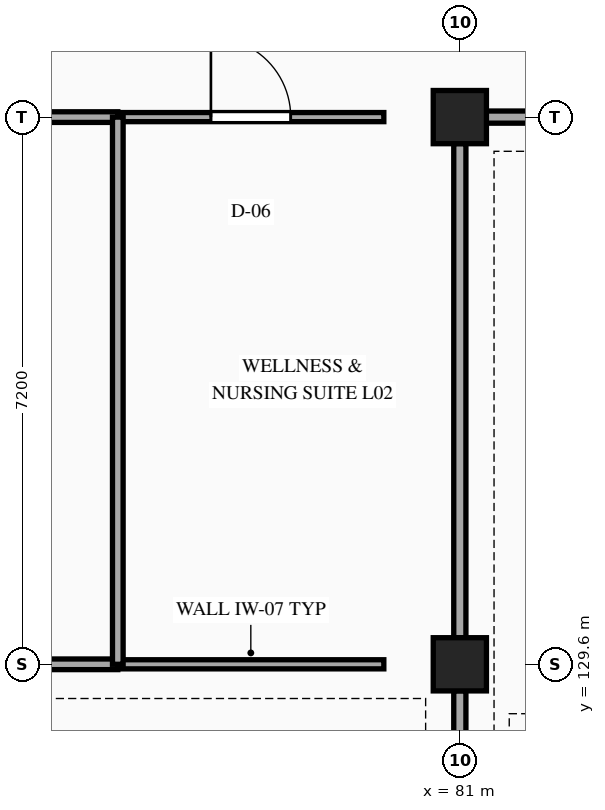
"""IFC4 building model, lengths in metres.
Left out: names, types, materials, properties, quantities, classifications, styles, units other than length and angle.
Written with IfcOpenShell. Run it as: python <this file> out.ifc"""

import sys

from ifc_helpers import new_model, si_unit, direction, frame, frame_2d, origin, origin_2d, place, context, subcontext, project, spatial, rectangle, extrude, element, fill, save


model = new_model("IFC4")
c1 = context("Model", 3, precision=1e-05, world=origin(), true_north=direction((0.0, 1.0)))
c2 = subcontext(c1, "Body", "Model", "MODEL_VIEW")
j1 = project(units=[si_unit("LENGTHUNIT", "METRE"), si_unit("PLANEANGLEUNIT", "RADIAN")], contexts=[c1])
p1 = place(None, origin())
s1 = spatial("IfcSite", under=j1, at=p1, CompositionType="ELEMENT")
p2 = place(p1, origin())
s2 = spatial("IfcBuilding", under=s1, at=p2, CompositionType="ELEMENT")
p3 = place(p2, frame((0.0, 0.0, 10.8)))
s3 = spatial("IfcBuildingStorey", under=s2, at=p3, CompositionType="ELEMENT", Elevation=10.8)
for number, where, z_axis, x_axis in (
    (1, (81.0, 129.6, 0.0), (0.0, 0.0, 1.0), (1.0, 0.0, 0.0)),
    (2, (81.0, 136.8, 0.0), (0.0, 0.0, 1.0), (1.0, 0.0, 0.0)),
):
    element("IfcColumn", number, at=place(p3, frame(where, z_axis=z_axis, x_axis=x_axis)), inside=s3, PredefinedType="COLUMN", context=c2, shape_type="SweptSolid", body=[
        extrude(rectangle(XDim=0.7, YDim=0.7, at=origin_2d()), origin(), (0.0, 0.0, 1.0), 4.5),
    ])
p4 = place(p3, frame((72.348, 129.6, 0.0), z_axis=(0.0, 0.0, 1.0), x_axis=(1.0, 0.0, 0.0)))
e3 = element("IfcWall", 3, at=p4, inside=s3, PredefinedType="PARTITIONING", context=c2, shape_type="SweptSolid", body=[
    extrude(rectangle(XDim=4.152, YDim=0.14, at=frame_2d((2.076, 0.0))), origin(), (0.0, 0.0, 1.0), 3.628),
])
p5 = place(p3, frame((76.5, 129.6, 0.0), z_axis=(0.0, 0.0, 1.0), x_axis=(1.0, 0.0, 0.0)))
e4 = element("IfcWall", 4, at=p5, inside=s3, PredefinedType="PARTITIONING", context=c2, shape_type="SweptSolid", body=[
    extrude(rectangle(XDim=3.5, YDim=0.12, at=frame_2d((1.75, 0.0))), origin(), (0.0, 0.0, 1.0), 3.628),
])
p6 = place(p3, frame((72.348, 136.8, 0.0), z_axis=(0.0, 0.0, 1.0), x_axis=(1.0, 0.0, 0.0)))
e5 = element("IfcWall", 5, at=p6, inside=s3, PredefinedType="PARTITIONING", context=c2, shape_type="SweptSolid", body=[
    extrude(rectangle(XDim=4.152, YDim=0.14, at=frame_2d((2.076, 0.0))), origin(), (0.0, 0.0, 1.0), 3.628),
])
p7 = place(p6, frame((1.601, 0.0, 0.0)))
e6 = element("IfcOpeningElement", 6, at=p7, cuts=e5, PredefinedType="OPENING", context=c2, shape_type="SweptSolid", body=[
    extrude(rectangle(XDim=0.95, YDim=2.1, at=frame_2d((0.475, 1.05))), frame((0.0, 0.08, 0.0), z_axis=(0.0, -1.0, 0.0), x_axis=(1.0, 0.0, 0.0)), (0.0, 0.0, 1.0), 0.16),
])
p8 = place(p3, frame((76.5, 136.8, 0.0), z_axis=(0.0, 0.0, 1.0), x_axis=(1.0, 0.0, 0.0)))
e7 = element("IfcWall", 7, at=p8, inside=s3, PredefinedType="PARTITIONING", context=c2, shape_type="SweptSolid", body=[
    extrude(rectangle(XDim=3.5, YDim=0.12, at=frame_2d((1.75, 0.0))), origin(), (0.0, 0.0, 1.0), 3.628),
])
p9 = place(p8, frame((1.225, 0.0, 0.0)))
e8 = element("IfcOpeningElement", 8, at=p9, cuts=e7, PredefinedType="OPENING", context=c2, shape_type="SweptSolid", body=[
    extrude(rectangle(XDim=1.05, YDim=2.15, at=frame_2d((0.525, 1.075))), frame((0.0, 0.07, 0.0), z_axis=(0.0, -1.0, 0.0), x_axis=(1.0, 0.0, 0.0)), (0.0, 0.0, 1.0), 0.14),
])
p10 = place(p3, frame((81.348, 136.8, 0.0), z_axis=(0.0, 0.0, 1.0), x_axis=(1.0, 0.0, 0.0)))
e9 = element("IfcWall", 9, at=p10, inside=s3, PredefinedType="PARTITIONING", context=c2, shape_type="SweptSolid", body=[
    extrude(rectangle(XDim=8.304, YDim=0.16, at=frame_2d((4.152, 0.0))), origin(), (0.0, 0.0, 1.0), 3.628),
])
p11 = place(p10, frame((3.352, 0.0, 0.0)))
e10 = element("IfcOpeningElement", 10, at=p11, cuts=e9, PredefinedType="OPENING", context=c2, shape_type="SweptSolid", body=[
    extrude(rectangle(XDim=1.6, YDim=2.2, at=frame_2d((0.8, 1.1))), frame((0.0, 0.09, 0.0), z_axis=(0.0, -1.0, 0.0), x_axis=(1.0, 0.0, 0.0)), (0.0, 0.0, 1.0), 0.18),
])
p12 = place(p3, frame((76.5, 129.6, 0.0), z_axis=(0.0, 0.0, 1.0), x_axis=(0.0, 1.0, 0.0)))
e11 = element("IfcWall", 11, at=p12, inside=s3, PredefinedType="PARTITIONING", context=c2, shape_type="SweptSolid", body=[
    extrude(rectangle(XDim=7.2, YDim=0.14, at=frame_2d((3.6, 0.0))), origin(), (0.0, 0.0, 1.0), 3.628),
])
p13 = place(p3, frame((81.0, 123.6, 0.0), z_axis=(0.0, 0.0, 1.0), x_axis=(0.0, 1.0, 0.0)))
e12 = element("IfcWall", 12, at=p13, inside=s3, PredefinedType="PARTITIONING", context=c2, shape_type="SweptSolid", body=[
    extrude(rectangle(XDim=5.652, YDim=0.16, at=frame_2d((2.826, 0.0))), origin(), (0.0, 0.0, 1.0), 3.628),
])
p14 = place(p3, frame((81.0, 129.948, 0.0), z_axis=(0.0, 0.0, 1.0), x_axis=(0.0, 1.0, 0.0)))
e13 = element("IfcWall", 13, at=p14, inside=s3, PredefinedType="PARTITIONING", context=c2, shape_type="SweptSolid", body=[
    extrude(rectangle(XDim=6.504, YDim=0.16, at=frame_2d((3.252, 0.0))), origin(), (0.0, 0.0, 1.0), 3.628),
])
p15 = place(p9, origin())
e14 = element("IfcDoor", 14, at=p15, inside=s3, OperationType="SINGLE_SWING_LEFT", PredefinedType="DOOR", context=c2, shape_type="SweptSolid", body=[
    extrude(rectangle(XDim=1.05, YDim=2.15, at=frame_2d((0.525, 1.075))), frame((0.0, 0.025, 0.0), z_axis=(0.0, -1.0, 0.0), x_axis=(1.0, 0.0, 0.0)), (0.0, 0.0, 1.0), 0.05),
])
fill(e8, e14)
save(model, sys.argv[1])
